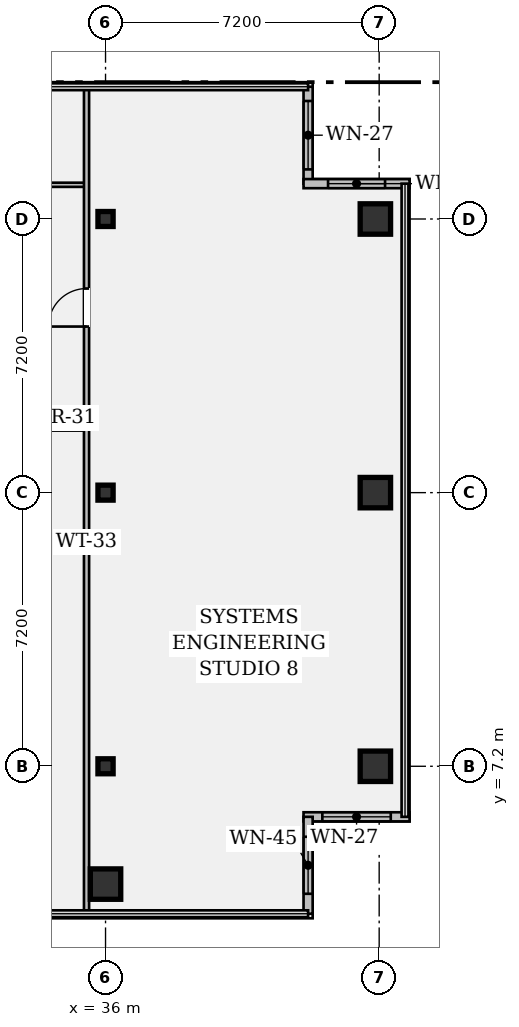
"""IFC4 building model, lengths in metres.
Left out: names, types, materials, properties, quantities, classifications, styles, units other than length and angle.
Written with IfcOpenShell. Run it as: python <this file> out.ifc"""

import sys

from ifc_helpers import new_model, si_unit, direction, frame, frame_2d, origin, origin_2d, place, context, subcontext, project, spatial, rectangle, hollow_rectangle, i_section, extrude, element, fill, save


model = new_model("IFC4")
c1 = context("Model", 3, precision=1e-05, world=origin(), true_north=direction((0.0, 1.0)))
c2 = subcontext(c1, "Body", "Model", "MODEL_VIEW")
j1 = project(units=[si_unit("LENGTHUNIT", "METRE"), si_unit("PLANEANGLEUNIT", "RADIAN")], contexts=[c1])
p1 = place(None, origin())
s1 = spatial("IfcSite", under=j1, at=p1, CompositionType="ELEMENT")
p2 = place(p1, origin())
s2 = spatial("IfcBuilding", under=s1, at=p2, CompositionType="ELEMENT")
p3 = place(p2, frame((0.0, 0.0, 190.75)))
s3 = spatial("IfcBuildingStorey", under=s2, at=p3, CompositionType="ELEMENT", Elevation=190.75)
p4 = place(p3, frame((36.0, 4.1, 0.0), z_axis=(0.0, 0.0, 1.0), x_axis=(1.0, 0.0, 0.0)))
e1 = element("IfcColumn", 1, at=p4, inside=s3, PredefinedType="COLUMN", context=c2, shape_type="SweptSolid", body=[
    extrude(hollow_rectangle(XDim=0.8, YDim=0.8, WallThickness=0.05, at=origin_2d()), origin(), (0.0, 0.0, 1.0), 3.24),
])
for number, where, z_axis, x_axis in (
    (2, (36.0, 7.2, 0.0), (0.0, 0.0, 1.0), (1.0, 0.0, 0.0)),
    (3, (36.0, 14.4, 0.0), (0.0, 0.0, 1.0), (1.0, 0.0, 0.0)),
    (4, (36.0, 21.6, 0.0), (0.0, 0.0, 1.0), (1.0, 0.0, 0.0)),
):
    element("IfcColumn", number, at=place(p3, frame(where, z_axis=z_axis, x_axis=x_axis)), inside=s3, PredefinedType="COLUMN", context=c2, shape_type="SweptSolid", body=[
        extrude(i_section(OverallWidth=0.399, OverallDepth=0.394, WebThickness=0.023, FlangeThickness=0.037, FilletRadius=0.018, at=origin_2d()), origin(), (0.0, 0.0, 1.0), 3.24),
    ])
for number, where, z_axis, x_axis in (
    (5, (43.1, 7.2, 0.0), (0.0, 0.0, 1.0), (1.0, 0.0, 0.0)),
    (6, (43.1, 14.4, 0.0), (0.0, 0.0, 1.0), (1.0, 0.0, 0.0)),
    (7, (43.1, 21.6, 0.0), (0.0, 0.0, 1.0), (1.0, 0.0, 0.0)),
):
    element("IfcColumn", number, at=place(p3, frame(where, z_axis=z_axis, x_axis=x_axis)), inside=s3, PredefinedType="COLUMN", context=c2, shape_type="SweptSolid", body=[
        extrude(hollow_rectangle(XDim=0.8, YDim=0.8, WallThickness=0.05, at=origin_2d()), origin(), (0.0, 0.0, 1.0), 3.24),
    ])
p5 = place(p3, frame((41.33, 25.08, 0.0), z_axis=(0.0, 0.0, 1.0), x_axis=(0.0, -1.0, 0.0)))
e8 = element("IfcWall", 8, at=p5, inside=s3, PredefinedType="STANDARD", context=c2, shape_type="SweptSolid", body=[
    extrude(rectangle(XDim=2.55, YDim=0.24, at=frame_2d((1.275, 0.0))), origin(), (0.0, 0.0, 1.0), 3.24),
])
p6 = place(p5, frame((0.375, 0.0, 0.95)))
e9 = element("IfcOpeningElement", 9, at=p6, cuts=e8, PredefinedType="OPENING", context=c2, shape_type="SweptSolid", body=[
    extrude(rectangle(XDim=1.8, YDim=1.35, at=frame_2d((0.9, 0.675))), frame((0.0, 0.132, 0.0), z_axis=(0.0, -1.0, 0.0), x_axis=(1.0, 0.0, 0.0)), (0.0, 0.0, 1.0), 0.264),
])
p7 = place(p3, frame((41.21, 22.53, 0.0), z_axis=(0.0, 0.0, 1.0), x_axis=(1.0, 0.0, 0.0)))
e10 = element("IfcWall", 10, at=p7, inside=s3, PredefinedType="STANDARD", context=c2, shape_type="SweptSolid", body=[
    extrude(rectangle(XDim=2.79, YDim=0.24, at=frame_2d((1.395, 0.0))), origin(), (0.0, 0.0, 1.0), 3.24),
])
p8 = place(p7, frame((0.645, 0.0, 0.95)))
e11 = element("IfcOpeningElement", 11, at=p8, cuts=e10, PredefinedType="OPENING", context=c2, shape_type="SweptSolid", body=[
    extrude(rectangle(XDim=1.5, YDim=1.8, at=frame_2d((0.75, 0.9))), frame((0.0, 0.132, 0.0), z_axis=(0.0, -1.0, 0.0), x_axis=(1.0, 0.0, 0.0)), (0.0, 0.0, 1.0), 0.264),
])
p9 = place(p3, frame((44.0, 5.87, 0.0), z_axis=(0.0, 0.0, 1.0), x_axis=(-1.0, 0.0, 0.0)))
e12 = element("IfcWall", 12, at=p9, inside=s3, PredefinedType="STANDARD", context=c2, shape_type="SweptSolid", body=[
    extrude(rectangle(XDim=2.79, YDim=0.24, at=frame_2d((1.395, 0.0))), origin(), (0.0, 0.0, 1.0), 3.24),
])
p10 = place(p9, frame((0.495, 0.0, 0.95)))
e13 = element("IfcOpeningElement", 13, at=p10, cuts=e12, PredefinedType="OPENING", context=c2, shape_type="SweptSolid", body=[
    extrude(rectangle(XDim=1.8, YDim=1.35, at=frame_2d((0.9, 0.675))), frame((0.0, 0.132, 0.0), z_axis=(0.0, -1.0, 0.0), x_axis=(1.0, 0.0, 0.0)), (0.0, 0.0, 1.0), 0.264),
])
p11 = place(p3, frame((41.33, 5.87, 0.0), z_axis=(0.0, 0.0, 1.0), x_axis=(0.0, -1.0, 0.0)))
e14 = element("IfcWall", 14, at=p11, inside=s3, PredefinedType="STANDARD", context=c2, shape_type="SweptSolid", body=[
    extrude(rectangle(XDim=2.55, YDim=0.24, at=frame_2d((1.275, 0.0))), origin(), (0.0, 0.0, 1.0), 3.24),
])
p12 = place(p11, frame((0.525, 0.0, 0.95)))
e15 = element("IfcOpeningElement", 15, at=p12, cuts=e14, PredefinedType="OPENING", context=c2, shape_type="SweptSolid", body=[
    extrude(rectangle(XDim=1.5, YDim=1.8, at=frame_2d((0.75, 0.9))), frame((0.0, 0.132, 0.0), z_axis=(0.0, -1.0, 0.0), x_axis=(1.0, 0.0, 0.0)), (0.0, 0.0, 1.0), 0.264),
])
p13 = place(p3, frame((33.55, 16.1, 0.0), z_axis=(0.0, 0.0, 1.0), x_axis=(1.0, 0.0, 0.0)))
e16 = element("IfcWall", 16, at=p13, inside=s3, PredefinedType="PARTITIONING", context=c2, shape_type="SweptSolid", body=[
    extrude(rectangle(XDim=1.95, YDim=0.135, at=frame_2d((0.975, 0.0))), origin(), (0.0, 0.0, 1.0), 2.808),
])
p14 = place(p3, frame((33.55, 22.5, 0.0), z_axis=(0.0, 0.0, 1.0), x_axis=(1.0, 0.0, 0.0)))
e17 = element("IfcWall", 17, at=p14, inside=s3, PredefinedType="PARTITIONING", context=c2, shape_type="SweptSolid", body=[
    extrude(rectangle(XDim=1.95, YDim=0.11, at=frame_2d((0.975, 0.0))), origin(), (0.0, 0.0, 1.0), 3.24),
])
p15 = place(p3, frame((35.5, 3.32, 0.0), z_axis=(0.0, 0.0, 1.0), x_axis=(0.0, 1.0, 0.0)))
e18 = element("IfcWall", 18, at=p15, inside=s3, PredefinedType="PARTITIONING", context=c2, shape_type="SweptSolid", body=[
    extrude(rectangle(XDim=21.76, YDim=0.135, at=frame_2d((10.88, 0.0))), origin(), (0.0, 0.0, 1.0), 2.603),
])
p16 = place(p15, frame((15.45, 0.0, 0.0)))
e19 = element("IfcOpeningElement", 19, at=p16, cuts=e18, PredefinedType="OPENING", context=c2, shape_type="SweptSolid", body=[
    extrude(rectangle(XDim=1.0, YDim=2.15, at=frame_2d((0.5, 1.075))), frame((0.0, 0.08, 0.0), z_axis=(0.0, -1.0, 0.0), x_axis=(1.0, 0.0, 0.0)), (0.0, 0.0, 1.0), 0.159),
])
p17 = place(p6, origin())
e20 = element("IfcWindow", 20, at=p17, inside=s3, PartitioningType="SINGLE_PANEL", PredefinedType="WINDOW", context=c2, shape_type="SweptSolid", body=[
    extrude(rectangle(XDim=1.8, YDim=1.35, at=frame_2d((0.9, 0.675))), frame((0.0, 0.03, 0.0), z_axis=(0.0, -1.0, 0.0), x_axis=(1.0, 0.0, 0.0)), (0.0, 0.0, 1.0), 0.06),
])
fill(e9, e20)
p18 = place(p8, origin())
e21 = element("IfcWindow", 21, at=p18, inside=s3, PartitioningType="SINGLE_PANEL", PredefinedType="WINDOW", context=c2, shape_type="SweptSolid", body=[
    extrude(rectangle(XDim=1.5, YDim=1.8, at=frame_2d((0.75, 0.9))), frame((0.0, 0.03, 0.0), z_axis=(0.0, -1.0, 0.0), x_axis=(1.0, 0.0, 0.0)), (0.0, 0.0, 1.0), 0.06),
])
fill(e11, e21)
p19 = place(p10, origin())
e22 = element("IfcWindow", 22, at=p19, inside=s3, PartitioningType="SINGLE_PANEL", PredefinedType="WINDOW", context=c2, shape_type="SweptSolid", body=[
    extrude(rectangle(XDim=1.8, YDim=1.35, at=frame_2d((0.9, 0.675))), frame((0.0, 0.03, 0.0), z_axis=(0.0, -1.0, 0.0), x_axis=(1.0, 0.0, 0.0)), (0.0, 0.0, 1.0), 0.06),
])
fill(e13, e22)
p20 = place(p12, origin())
e23 = element("IfcWindow", 23, at=p20, inside=s3, PartitioningType="SINGLE_PANEL", PredefinedType="WINDOW", context=c2, shape_type="SweptSolid", body=[
    extrude(rectangle(XDim=1.5, YDim=1.8, at=frame_2d((0.75, 0.9))), frame((0.0, 0.03, 0.0), z_axis=(0.0, -1.0, 0.0), x_axis=(1.0, 0.0, 0.0)), (0.0, 0.0, 1.0), 0.06),
])
fill(e15, e23)
p21 = place(p16, origin())
e24 = element("IfcDoor", 24, at=p21, inside=s3, OperationType="SINGLE_SWING_LEFT", PredefinedType="DOOR", context=c2, shape_type="SweptSolid", body=[
    extrude(rectangle(XDim=1.0, YDim=2.15, at=frame_2d((0.5, 1.075))), frame((0.0, 0.025, 0.0), z_axis=(0.0, -1.0, 0.0), x_axis=(1.0, 0.0, 0.0)), (0.0, 0.0, 1.0), 0.05),
])
fill(e19, e24)
save(model, sys.argv[1])
